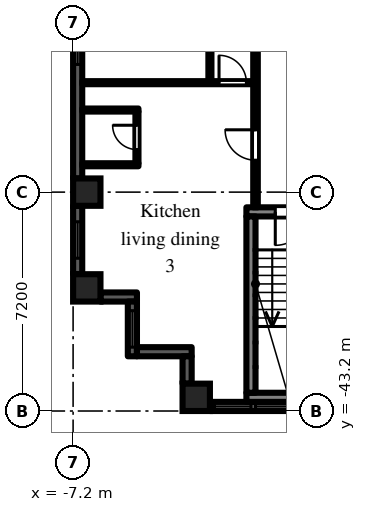
"""IFC4 building model, lengths in metres.
Left out: names, types, materials, properties, quantities, classifications, styles, units other than length and angle.
Written with IfcOpenShell. Run it as: python <this file> out.ifc"""

import sys

from ifc_helpers import new_model, si_unit, direction, frame, frame_2d, origin, origin_2d, place, context, subcontext, project, spatial, rectangle, extrude, element, fill, save


model = new_model("IFC4")
c1 = context("Model", 3, precision=1e-05, world=origin(), true_north=direction((0.0, 1.0)))
c2 = subcontext(c1, "Body", "Model", "MODEL_VIEW")
j1 = project(units=[si_unit("LENGTHUNIT", "METRE"), si_unit("PLANEANGLEUNIT", "RADIAN")], contexts=[c1])
p1 = place(None, origin())
s1 = spatial("IfcSite", under=j1, at=p1, CompositionType="ELEMENT")
p2 = place(p1, origin())
s2 = spatial("IfcBuilding", under=s1, at=p2, CompositionType="ELEMENT")
p3 = place(p2, frame((0.0, 0.0, 44.7)))
s3 = spatial("IfcBuildingStorey", under=s2, at=p3, CompositionType="ELEMENT", Elevation=44.7)
for number, where, z_axis, x_axis in (
    (1, (-6.75, -39.15, 0.0), (0.0, 0.0, 1.0), (1.0, 0.0, 0.0)),
    (2, (-6.75, -36.0, 0.0), (0.0, 0.0, 1.0), (1.0, 0.0, 0.0)),
    (3, (-3.15, -42.75, 0.0), (0.0, 0.0, 1.0), (1.0, 0.0, 0.0)),
):
    element("IfcColumn", number, at=place(p3, frame(where, z_axis=z_axis, x_axis=x_axis)), inside=s3, PredefinedType="COLUMN", context=c2, shape_type="SweptSolid", body=[
        extrude(rectangle(XDim=0.9, YDim=0.9, at=origin_2d()), origin(), (0.0, 0.0, 1.0), 3.0),
    ])
p4 = place(p3, frame((-7.05, -29.25, 0.0), z_axis=(0.0, 0.0, 1.0), x_axis=(0.0, -1.0, 0.0)))
e4 = element("IfcWall", 4, at=p4, inside=s3, PredefinedType="SOLIDWALL", context=c2, shape_type="SweptSolid", body=[
    extrude(rectangle(XDim=6.3, YDim=0.3, at=frame_2d((3.15, 0.0))), origin(), (0.0, 0.0, 1.0), 2.1),
])
p5 = place(p4, frame((0.15, 0.0, 0.2)))
e5 = element("IfcOpeningElement", 5, at=p5, cuts=e4, PredefinedType="OPENING", context=c2, shape_type="SweptSolid", body=[
    extrude(rectangle(XDim=2.4, YDim=1.85, at=frame_2d((1.2, 0.925))), frame((0.0, 0.16, 0.0), z_axis=(0.0, -1.0, 0.0), x_axis=(1.0, 0.0, 0.0)), (0.0, 0.0, 1.0), 0.32),
])
p6 = place(p3, frame((-7.05, -36.45, 0.0), z_axis=(0.0, 0.0, 1.0), x_axis=(0.0, -1.0, 0.0)))
e6 = element("IfcWall", 6, at=p6, inside=s3, PredefinedType="SOLIDWALL", context=c2, shape_type="SweptSolid", body=[
    extrude(rectangle(XDim=2.25, YDim=0.3, at=frame_2d((1.125, 0.0))), origin(), (0.0, 0.0, 1.0), 2.1),
])
p7 = place(p6, frame((0.525, 0.0, 0.2)))
e7 = element("IfcOpeningElement", 7, at=p7, cuts=e6, PredefinedType="OPENING", context=c2, shape_type="SweptSolid", body=[
    extrude(rectangle(XDim=1.2, YDim=1.85, at=frame_2d((0.6, 0.925))), frame((0.0, 0.16, 0.0), z_axis=(0.0, -1.0, 0.0), x_axis=(1.0, 0.0, 0.0)), (0.0, 0.0, 1.0), 0.32),
])
p8 = place(p3, frame((-6.3, -39.45, 0.0), z_axis=(0.0, 0.0, 1.0), x_axis=(1.0, 0.0, 0.0)))
e8 = element("IfcWall", 8, at=p8, inside=s3, PredefinedType="SOLIDWALL", context=c2, shape_type="SweptSolid", body=[
    extrude(rectangle(XDim=1.2, YDim=0.3, at=frame_2d((0.6, 0.0))), origin(), (0.0, 0.0, 1.0), 2.575),
])
p9 = place(p3, frame((-5.25, -39.6, 0.0), z_axis=(0.0, 0.0, 1.0), x_axis=(0.0, -1.0, 0.0)))
e9 = element("IfcWall", 9, at=p9, inside=s3, PredefinedType="SOLIDWALL", context=c2, shape_type="SweptSolid", body=[
    extrude(rectangle(XDim=1.8, YDim=0.3, at=frame_2d((0.9, 0.0))), origin(), (0.0, 0.0, 1.0), 2.575),
])
p10 = place(p9, frame((0.3, 0.0, 0.2)))
e10 = element("IfcOpeningElement", 10, at=p10, cuts=e9, PredefinedType="OPENING", context=c2, shape_type="SweptSolid", body=[
    extrude(rectangle(XDim=1.2, YDim=1.85, at=frame_2d((0.6, 0.925))), frame((0.0, 0.16, 0.0), z_axis=(0.0, -1.0, 0.0), x_axis=(1.0, 0.0, 0.0)), (0.0, 0.0, 1.0), 0.32),
])
p11 = place(p3, frame((-5.1, -41.25, 0.0), z_axis=(0.0, 0.0, 1.0), x_axis=(1.0, 0.0, 0.0)))
e11 = element("IfcWall", 11, at=p11, inside=s3, PredefinedType="SOLIDWALL", context=c2, shape_type="SweptSolid", body=[
    extrude(rectangle(XDim=1.8, YDim=0.3, at=frame_2d((0.9, 0.0))), origin(), (0.0, 0.0, 1.0), 2.575),
])
p12 = place(p3, frame((-3.45, -41.4, 0.0), z_axis=(0.0, 0.0, 1.0), x_axis=(0.0, -1.0, 0.0)))
e12 = element("IfcWall", 12, at=p12, inside=s3, PredefinedType="SOLIDWALL", context=c2, shape_type="SweptSolid", body=[
    extrude(rectangle(XDim=0.9, YDim=0.3, at=frame_2d((0.45, 0.0))), origin(), (0.0, 0.0, 1.0), 2.575),
])
p13 = place(p3, frame((-2.7, -43.05, 0.0), z_axis=(0.0, 0.0, 1.0), x_axis=(1.0, 0.0, 0.0)))
e13 = element("IfcWall", 13, at=p13, inside=s3, PredefinedType="SOLIDWALL", context=c2, shape_type="SweptSolid", body=[
    extrude(rectangle(XDim=5.4, YDim=0.3, at=frame_2d((2.7, 0.0))), origin(), (0.0, 0.0, 1.0), 2.1),
])
p14 = place(p13, frame((1.5, 0.0, 0.2)))
e14 = element("IfcOpeningElement", 14, at=p14, cuts=e13, PredefinedType="OPENING", context=c2, shape_type="SweptSolid", body=[
    extrude(rectangle(XDim=2.4, YDim=1.85, at=frame_2d((1.2, 0.925))), frame((0.0, 0.16, 0.0), z_axis=(0.0, -1.0, 0.0), x_axis=(1.0, 0.0, 0.0)), (0.0, 0.0, 1.0), 0.32),
])
p15 = place(p13, frame((0.15, 0.0, 0.2)))
e15 = element("IfcOpeningElement", 15, at=p15, cuts=e13, PredefinedType="OPENING", context=c2, shape_type="SweptSolid", body=[
    extrude(rectangle(XDim=1.2, YDim=1.85, at=frame_2d((0.6, 0.925))), frame((0.0, 0.16, 0.0), z_axis=(0.0, -1.0, 0.0), x_axis=(1.0, 0.0, 0.0)), (0.0, 0.0, 1.0), 0.32),
])
p16 = place(p13, frame((4.05, 0.0, 0.2)))
e16 = element("IfcOpeningElement", 16, at=p16, cuts=e13, PredefinedType="OPENING", context=c2, shape_type="SweptSolid", body=[
    extrude(rectangle(XDim=1.2, YDim=1.85, at=frame_2d((0.6, 0.925))), frame((0.0, 0.16, 0.0), z_axis=(0.0, -1.0, 0.0), x_axis=(1.0, 0.0, 0.0)), (0.0, 0.0, 1.0), 0.32),
])
p17 = place(p3, frame((-1.5, -36.65, 0.0), z_axis=(0.0, 0.0, 1.0), x_axis=(1.0, 0.0, 0.0)))
e17 = element("IfcWall", 17, at=p17, inside=s3, PredefinedType="SHEAR", context=c2, shape_type="SweptSolid", body=[
    extrude(rectangle(XDim=3.0, YDim=0.3, at=frame_2d((1.5, 0.0))), origin(), (0.0, 0.0, 1.0), 2.575),
])
p18 = place(p17, frame((0.95, 0.0, 0.0)))
e18 = element("IfcOpeningElement", 18, at=p18, cuts=e17, PredefinedType="OPENING", context=c2, shape_type="SweptSolid", body=[
    extrude(rectangle(XDim=1.1, YDim=2.1, at=frame_2d((0.55, 1.05))), frame((0.0, 0.16, 0.0), z_axis=(0.0, -1.0, 0.0), x_axis=(1.0, 0.0, 0.0)), (0.0, 0.0, 1.0), 0.32),
])
p19 = place(p3, frame((-1.5, -42.75, 0.0), z_axis=(0.0, 0.0, 1.0), x_axis=(1.0, 0.0, 0.0)))
e19 = element("IfcWall", 19, at=p19, inside=s3, PredefinedType="SHEAR", context=c2, shape_type="SweptSolid", body=[
    extrude(rectangle(XDim=3.0, YDim=0.3, at=frame_2d((1.5, 0.0))), origin(), (0.0, 0.0, 1.0), 2.575),
])
p20 = place(p3, frame((-1.35, -36.8, 0.0), z_axis=(0.0, 0.0, 1.0), x_axis=(0.0, -1.0, 0.0)))
e20 = element("IfcWall", 20, at=p20, inside=s3, PredefinedType="SHEAR", context=c2, shape_type="SweptSolid", body=[
    extrude(rectangle(XDim=5.8, YDim=0.3, at=frame_2d((2.9, 0.0))), origin(), (0.0, 0.0, 1.0), 2.575),
])
for number, where, z_axis, x_axis in (
    (21, (-6.9, -35.1, 0.0), (0.0, 0.0, 1.0), (1.0, 0.0, 0.0)),
    (22, (-6.9, -33.3, 0.0), (0.0, 0.0, 1.0), (1.0, 0.0, 0.0)),
):
    element("IfcWall", number, at=place(p3, frame(where, z_axis=z_axis, x_axis=x_axis)), inside=s3, PredefinedType="PARTITIONING", context=c2, shape_type="SweptSolid", body=[
        extrude(rectangle(XDim=1.85, YDim=0.1, at=frame_2d((0.925, 0.0))), origin(), (0.0, 0.0, 1.0), 2.575),
    ])
p21 = place(p3, frame((-6.9, -32.4, 0.0), z_axis=(0.0, 0.0, 1.0), x_axis=(1.0, 0.0, 0.0)))
e23 = element("IfcWall", 23, at=p21, inside=s3, PredefinedType="PARTITIONING", context=c2, shape_type="SweptSolid", body=[
    extrude(rectangle(XDim=5.625, YDim=0.1, at=frame_2d((2.812, 0.0))), origin(), (0.0, 0.0, 1.0), 2.575),
])
p22 = place(p21, frame((4.5, 0.0, 0.0)))
e24 = element("IfcOpeningElement", 24, at=p22, cuts=e23, PredefinedType="OPENING", context=c2, shape_type="SweptSolid", body=[
    extrude(rectangle(XDim=0.9, YDim=2.1, at=frame_2d((0.45, 1.05))), frame((0.0, 0.06, 0.0), z_axis=(0.0, -1.0, 0.0), x_axis=(1.0, 0.0, 0.0)), (0.0, 0.0, 1.0), 0.12),
])
p23 = place(p3, frame((-5.1, -35.05, 0.0), z_axis=(0.0, 0.0, 1.0), x_axis=(0.0, 1.0, 0.0)))
e25 = element("IfcWall", 25, at=p23, inside=s3, PredefinedType="PARTITIONING", context=c2, shape_type="SweptSolid", body=[
    extrude(rectangle(XDim=1.7, YDim=0.1, at=frame_2d((0.85, 0.0))), origin(), (0.0, 0.0, 1.0), 2.575),
])
p24 = place(p23, frame((0.45, 0.0, 0.0)))
e26 = element("IfcOpeningElement", 26, at=p24, cuts=e25, PredefinedType="OPENING", context=c2, shape_type="SweptSolid", body=[
    extrude(rectangle(XDim=0.8, YDim=2.1, at=frame_2d((0.4, 1.05))), frame((0.0, 0.06, 0.0), z_axis=(0.0, -1.0, 0.0), x_axis=(1.0, 0.0, 0.0)), (0.0, 0.0, 1.0), 0.12),
])
p25 = place(p3, frame((-2.7, -32.35, 0.0), z_axis=(0.0, 0.0, 1.0), x_axis=(0.0, 1.0, 0.0)))
e27 = element("IfcWall", 27, at=p25, inside=s3, PredefinedType="PARTITIONING", context=c2, shape_type="SweptSolid", body=[
    extrude(rectangle(XDim=14.3, YDim=0.1, at=frame_2d((7.15, 0.0))), origin(), (0.0, 0.0, 1.0), 2.575),
])
p26 = place(p25, frame((3.28, 0.0, 0.0)))
e28 = element("IfcOpeningElement", 28, at=p26, cuts=e27, PredefinedType="OPENING", context=c2, shape_type="SweptSolid", body=[
    extrude(rectangle(XDim=0.9, YDim=2.1, at=frame_2d((0.45, 1.05))), frame((0.0, 0.06, 0.0), z_axis=(0.0, -1.0, 0.0), x_axis=(1.0, 0.0, 0.0)), (0.0, 0.0, 1.0), 0.12),
])
p27 = place(p25, frame((10.12, 0.0, 0.0)))
e29 = element("IfcOpeningElement", 29, at=p27, cuts=e27, PredefinedType="OPENING", context=c2, shape_type="SweptSolid", body=[
    extrude(rectangle(XDim=0.9, YDim=2.1, at=frame_2d((0.45, 1.05))), frame((0.0, 0.06, 0.0), z_axis=(0.0, -1.0, 0.0), x_axis=(1.0, 0.0, 0.0)), (0.0, 0.0, 1.0), 0.12),
])
p28 = place(p3, frame((-1.2, -36.5, 0.0), z_axis=(0.0, 0.0, 1.0), x_axis=(0.0, 1.0, 0.0)))
e30 = element("IfcWall", 30, at=p28, inside=s3, PredefinedType="PARTITIONING", context=c2, shape_type="SweptSolid", body=[
    extrude(rectangle(XDim=35.225, YDim=0.15, at=frame_2d((17.613, 0.0))), origin(), (0.0, 0.0, 1.0), 2.575),
])
p29 = place(p28, frame((31.85, 0.0, 0.0)))
e31 = element("IfcOpeningElement", 31, at=p29, cuts=e30, PredefinedType="OPENING", context=c2, shape_type="SweptSolid", body=[
    extrude(rectangle(XDim=0.9, YDim=2.1, at=frame_2d((0.45, 1.05))), frame((0.0, 0.085, 0.0), z_axis=(0.0, -1.0, 0.0), x_axis=(1.0, 0.0, 0.0)), (0.0, 0.0, 1.0), 0.17),
])
p30 = place(p28, frame((27.05, 0.0, 0.0)))
e32 = element("IfcOpeningElement", 32, at=p30, cuts=e30, PredefinedType="OPENING", context=c2, shape_type="SweptSolid", body=[
    extrude(rectangle(XDim=0.9, YDim=2.1, at=frame_2d((0.45, 1.05))), frame((0.0, 0.085, 0.0), z_axis=(0.0, -1.0, 0.0), x_axis=(1.0, 0.0, 0.0)), (0.0, 0.0, 1.0), 0.17),
])
p31 = place(p28, frame((19.85, 0.0, 0.0)))
e33 = element("IfcOpeningElement", 33, at=p31, cuts=e30, PredefinedType="OPENING", context=c2, shape_type="SweptSolid", body=[
    extrude(rectangle(XDim=0.9, YDim=2.1, at=frame_2d((0.45, 1.05))), frame((0.0, 0.085, 0.0), z_axis=(0.0, -1.0, 0.0), x_axis=(1.0, 0.0, 0.0)), (0.0, 0.0, 1.0), 0.17),
])
p32 = place(p28, frame((1.55, 0.0, 0.0)))
e34 = element("IfcOpeningElement", 34, at=p32, cuts=e30, PredefinedType="OPENING", context=c2, shape_type="SweptSolid", body=[
    extrude(rectangle(XDim=1.0, YDim=2.1, at=frame_2d((0.5, 1.05))), frame((0.0, 0.085, 0.0), z_axis=(0.0, -1.0, 0.0), x_axis=(1.0, 0.0, 0.0)), (0.0, 0.0, 1.0), 0.17),
])
p33 = place(p5, origin())
e35 = element("IfcWindow", 35, at=p33, inside=s3, PartitioningType="SINGLE_PANEL", PredefinedType="WINDOW", context=c2, shape_type="SweptSolid", body=[
    extrude(rectangle(XDim=2.4, YDim=1.85, at=frame_2d((1.2, 0.925))), frame((0.0, 0.03, 0.0), z_axis=(0.0, -1.0, 0.0), x_axis=(1.0, 0.0, 0.0)), (0.0, 0.0, 1.0), 0.06),
])
fill(e5, e35)
p34 = place(p7, origin())
e36 = element("IfcWindow", 36, at=p34, inside=s3, PartitioningType="SINGLE_PANEL", PredefinedType="WINDOW", context=c2, shape_type="SweptSolid", body=[
    extrude(rectangle(XDim=1.2, YDim=1.85, at=frame_2d((0.6, 0.925))), frame((0.0, 0.03, 0.0), z_axis=(0.0, -1.0, 0.0), x_axis=(1.0, 0.0, 0.0)), (0.0, 0.0, 1.0), 0.06),
])
fill(e7, e36)
p35 = place(p10, origin())
e37 = element("IfcWindow", 37, at=p35, inside=s3, PartitioningType="SINGLE_PANEL", PredefinedType="WINDOW", context=c2, shape_type="SweptSolid", body=[
    extrude(rectangle(XDim=1.2, YDim=1.85, at=frame_2d((0.6, 0.925))), frame((0.0, 0.03, 0.0), z_axis=(0.0, -1.0, 0.0), x_axis=(1.0, 0.0, 0.0)), (0.0, 0.0, 1.0), 0.06),
])
fill(e10, e37)
p36 = place(p14, origin())
e38 = element("IfcWindow", 38, at=p36, inside=s3, PartitioningType="SINGLE_PANEL", PredefinedType="WINDOW", context=c2, shape_type="SweptSolid", body=[
    extrude(rectangle(XDim=2.4, YDim=1.85, at=frame_2d((1.2, 0.925))), frame((0.0, 0.03, 0.0), z_axis=(0.0, -1.0, 0.0), x_axis=(1.0, 0.0, 0.0)), (0.0, 0.0, 1.0), 0.06),
])
fill(e14, e38)
p37 = place(p15, origin())
e39 = element("IfcWindow", 39, at=p37, inside=s3, PartitioningType="SINGLE_PANEL", PredefinedType="WINDOW", context=c2, shape_type="SweptSolid", body=[
    extrude(rectangle(XDim=1.2, YDim=1.85, at=frame_2d((0.6, 0.925))), frame((0.0, 0.03, 0.0), z_axis=(0.0, -1.0, 0.0), x_axis=(1.0, 0.0, 0.0)), (0.0, 0.0, 1.0), 0.06),
])
fill(e15, e39)
p38 = place(p18, frame((1.1, 0.0, 0.0), z_axis=(0.0, 0.0, 1.0), x_axis=(-1.0, 0.0, 0.0)))
e40 = element("IfcDoor", 40, at=p38, inside=s3, OperationType="SINGLE_SWING_RIGHT", PredefinedType="DOOR", context=c2, shape_type="SweptSolid", body=[
    extrude(rectangle(XDim=1.1, YDim=2.1, at=frame_2d((0.55, 1.05))), frame((0.0, 0.025, 0.0), z_axis=(0.0, -1.0, 0.0), x_axis=(1.0, 0.0, 0.0)), (0.0, 0.0, 1.0), 0.05),
])
fill(e18, e40)
p39 = place(p24, origin())
e41 = element("IfcDoor", 41, at=p39, inside=s3, OperationType="SINGLE_SWING_RIGHT", PredefinedType="DOOR", context=c2, shape_type="SweptSolid", body=[
    extrude(rectangle(XDim=0.8, YDim=2.1, at=frame_2d((0.4, 1.05))), frame((0.0, 0.025, 0.0), z_axis=(0.0, -1.0, 0.0), x_axis=(1.0, 0.0, 0.0)), (0.0, 0.0, 1.0), 0.05),
])
fill(e26, e41)
p40 = place(p32, origin())
e42 = element("IfcDoor", 42, at=p40, inside=s3, OperationType="SINGLE_SWING_RIGHT", PredefinedType="DOOR", context=c2, shape_type="SweptSolid", body=[
    extrude(rectangle(XDim=1.0, YDim=2.1, at=frame_2d((0.5, 1.05))), frame((0.0, 0.025, 0.0), z_axis=(0.0, -1.0, 0.0), x_axis=(1.0, 0.0, 0.0)), (0.0, 0.0, 1.0), 0.05),
])
fill(e34, e42)
p41 = place(p22, origin())
e43 = element("IfcDoor", 43, at=p41, inside=s3, OperationType="SINGLE_SWING_LEFT", PredefinedType="DOOR", context=c2, shape_type="SweptSolid", body=[
    extrude(rectangle(XDim=0.9, YDim=2.1, at=frame_2d((0.45, 1.05))), frame((0.0, 0.025, 0.0), z_axis=(0.0, -1.0, 0.0), x_axis=(1.0, 0.0, 0.0)), (0.0, 0.0, 1.0), 0.05),
])
fill(e24, e43)
save(model, sys.argv[1])
